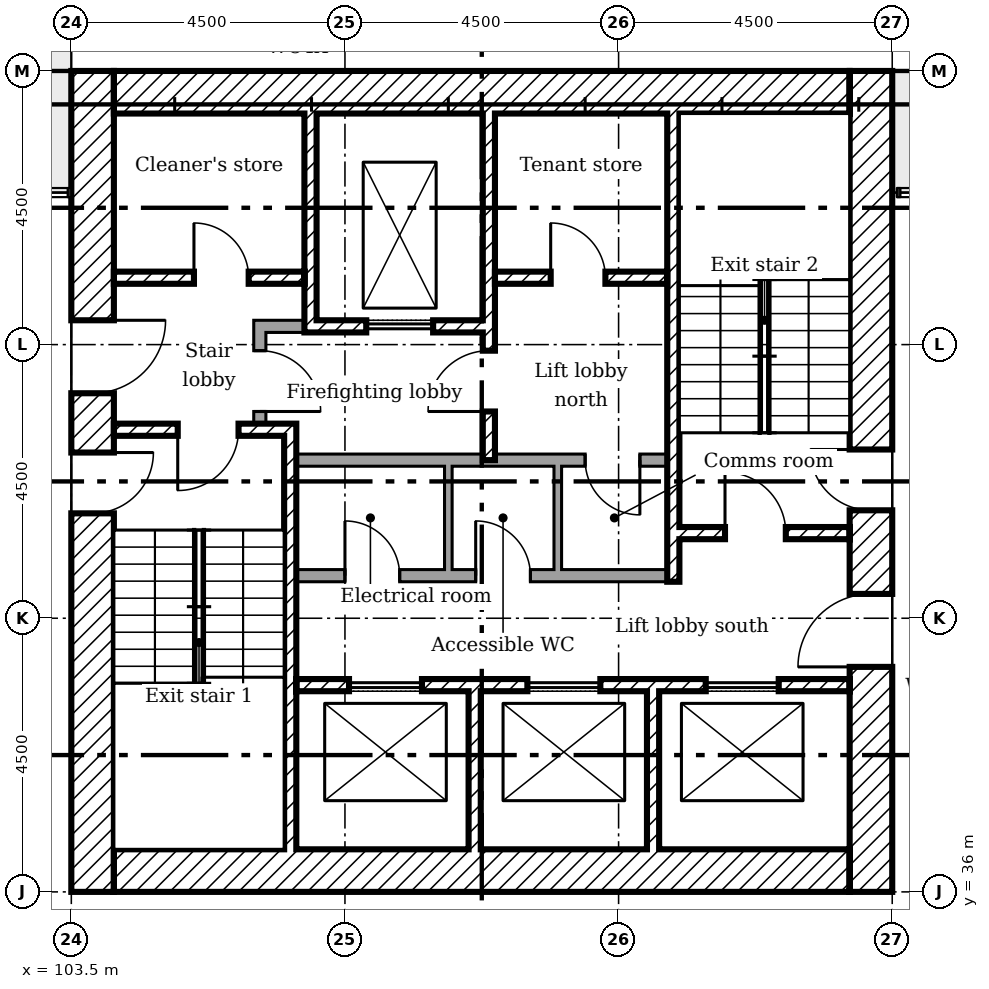
"""IFC4 building model, lengths in metres.
Left out: names, types, materials, properties, quantities, classifications, styles, units other than length and angle.
Written with IfcOpenShell. Run it as: python <this file> out.ifc"""

import sys

from ifc_helpers import new_model, si_unit, direction, frame, frame_2d, origin, place, context, subcontext, project, spatial, rectangle, extrude, element, fill, save


model = new_model("IFC4")
c1 = context("Model", 3, precision=1e-05, world=origin(), true_north=direction((0.0, 1.0)))
c2 = subcontext(c1, "Body", "Model", "MODEL_VIEW")
j1 = project(units=[si_unit("LENGTHUNIT", "METRE"), si_unit("PLANEANGLEUNIT", "RADIAN")], contexts=[c1])
p1 = place(None, origin())
s1 = spatial("IfcSite", under=j1, at=p1, CompositionType="ELEMENT")
p2 = place(p1, origin())
s2 = spatial("IfcBuilding", under=s1, at=p2, CompositionType="ELEMENT")
p3 = place(p2, frame((0.0, 0.0, 131.6)))
s3 = spatial("IfcBuildingStorey", under=s2, at=p3, CompositionType="ELEMENT", Elevation=131.6)
p4 = place(p3, frame((116.65, 36.0, 0.0), z_axis=(0.0, 0.0, 1.0), x_axis=(0.0, 1.0, 0.0)))
e1 = element("IfcWall", 1, at=p4, inside=s3, PredefinedType="SHEAR", context=c2, shape_type="SweptSolid", body=[
    extrude(rectangle(XDim=13.5, YDim=0.7, at=frame_2d((6.75, 0.0))), origin(), (0.0, 0.0, 1.0), 3.35),
])
p5 = place(p4, frame((3.7, 0.0, 0.0)))
e2 = element("IfcOpeningElement", 2, at=p5, cuts=e1, PredefinedType="OPENING", context=c2, shape_type="SweptSolid", body=[
    extrude(rectangle(XDim=1.2, YDim=2.1, at=frame_2d((0.6, 1.05))), frame((0.0, 0.36, 0.0), z_axis=(0.0, -1.0, 0.0), x_axis=(1.0, 0.0, 0.0)), (0.0, 0.0, 1.0), 0.72),
])
p6 = place(p4, frame((6.275, 0.0, 0.0)))
e3 = element("IfcOpeningElement", 3, at=p6, cuts=e1, PredefinedType="OPENING", context=c2, shape_type="SweptSolid", body=[
    extrude(rectangle(XDim=1.0, YDim=2.1, at=frame_2d((0.5, 1.05))), frame((0.0, 0.36, 0.0), z_axis=(0.0, -1.0, 0.0), x_axis=(1.0, 0.0, 0.0)), (0.0, 0.0, 1.0), 0.72),
])
for number, where in (
    (4, (104.2, 49.15, 0.0)),
    (5, (104.2, 36.35, 0.0)),
):
    element("IfcWall", number, at=place(p3, frame(where)), inside=s3, PredefinedType="SHEAR", context=c2, shape_type="SweptSolid", body=[
        extrude(rectangle(XDim=12.1, YDim=0.7, at=frame_2d((6.05, 0.0))), origin(), (0.0, 0.0, 1.0), 3.35),
    ])
p7 = place(p3, frame((103.85, 36.0, 0.0), z_axis=(0.0, 0.0, 1.0), x_axis=(0.0, 1.0, 0.0)))
e6 = element("IfcWall", 6, at=p7, inside=s3, PredefinedType="SHEAR", context=c2, shape_type="SweptSolid", body=[
    extrude(rectangle(XDim=13.5, YDim=0.7, at=frame_2d((6.75, 0.0))), origin(), (0.0, 0.0, 1.0), 3.35),
])
p8 = place(p7, frame((8.2, 0.0, 0.0)))
e7 = element("IfcOpeningElement", 7, at=p8, cuts=e6, PredefinedType="OPENING", context=c2, shape_type="SweptSolid", body=[
    extrude(rectangle(XDim=1.2, YDim=2.1, at=frame_2d((0.6, 1.05))), frame((0.0, 0.36, 0.0), z_axis=(0.0, -1.0, 0.0), x_axis=(1.0, 0.0, 0.0)), (0.0, 0.0, 1.0), 0.72),
])
p9 = place(p7, frame((6.225, 0.0, 0.0)))
e8 = element("IfcOpeningElement", 8, at=p9, cuts=e6, PredefinedType="OPENING", context=c2, shape_type="SweptSolid", body=[
    extrude(rectangle(XDim=1.0, YDim=2.1, at=frame_2d((0.5, 1.05))), frame((0.0, 0.36, 0.0), z_axis=(0.0, -1.0, 0.0), x_axis=(1.0, 0.0, 0.0)), (0.0, 0.0, 1.0), 0.72),
])
p10 = place(p3, frame((107.433, 48.8, 0.0), z_axis=(0.0, 0.0, 1.0), x_axis=(0.0, -1.0, 0.0)))
e9 = element("IfcWall", 9, at=p10, inside=s3, PredefinedType="SHEAR", context=c2, shape_type="SweptSolid", body=[
    extrude(rectangle(XDim=3.6, YDim=0.2, at=frame_2d((1.8, 0.0))), origin(), (0.0, 0.0, 1.0), 3.35),
])
p11 = place(p3, frame((110.367, 48.8, 0.0), z_axis=(0.0, 0.0, 1.0), x_axis=(0.0, -1.0, 0.0)))
e10 = element("IfcWall", 10, at=p11, inside=s3, PredefinedType="SHEAR", context=c2, shape_type="SweptSolid", body=[
    extrude(rectangle(XDim=5.7, YDim=0.2, at=frame_2d((2.85, 0.0))), origin(), (0.0, 0.0, 1.0), 3.35),
])
p12 = place(p11, frame((3.9, 0.0, 0.0)))
e11 = element("IfcOpeningElement", 11, at=p12, cuts=e10, PredefinedType="OPENING", context=c2, shape_type="SweptSolid", body=[
    extrude(rectangle(XDim=1.0, YDim=2.1, at=frame_2d((0.5, 1.05))), frame((0.0, 0.11, 0.0), z_axis=(0.0, -1.0, 0.0), x_axis=(1.0, 0.0, 0.0)), (0.0, 0.0, 1.0), 0.22),
])
for number, where, z_axis, x_axis in (
    (12, (110.133, 36.7, 0.0), (0.0, 0.0, 1.0), (0.0, 1.0, 0.0)),
    (13, (113.067, 36.7, 0.0), (0.0, 0.0, 1.0), (0.0, 1.0, 0.0)),
):
    element("IfcWall", number, at=place(p3, frame(where, z_axis=z_axis, x_axis=x_axis)), inside=s3, PredefinedType="SHEAR", context=c2, shape_type="SweptSolid", body=[
        extrude(rectangle(XDim=2.6, YDim=0.2, at=frame_2d((1.3, 0.0))), origin(), (0.0, 0.0, 1.0), 3.35),
    ])
p13 = place(p3, frame((106.5, 45.3, 0.0)))
e14 = element("IfcWall", 14, at=p13, inside=s3, PredefinedType="PARTITIONING", context=c2, shape_type="SweptSolid", body=[
    extrude(rectangle(XDim=0.833, YDim=0.2, at=frame_2d((0.417, 0.0))), origin(), (0.0, 0.0, 1.0), 3.35),
])
p14 = place(p3, frame((106.6, 43.7, 0.0), z_axis=(0.0, 0.0, 1.0), x_axis=(0.0, 1.0, 0.0)))
e15 = element("IfcWall", 15, at=p14, inside=s3, PredefinedType="PARTITIONING", context=c2, shape_type="SweptSolid", body=[
    extrude(rectangle(XDim=1.5, YDim=0.2, at=frame_2d((0.75, 0.0))), origin(), (0.0, 0.0, 1.0), 3.35),
])
p15 = place(p14, frame((0.2, 0.0, 0.0)))
e16 = element("IfcOpeningElement", 16, at=p15, cuts=e15, PredefinedType="OPENING", context=c2, shape_type="SweptSolid", body=[
    extrude(rectangle(XDim=1.0, YDim=2.1, at=frame_2d((0.5, 1.05))), frame((0.0, 0.11, 0.0), z_axis=(0.0, -1.0, 0.0), x_axis=(1.0, 0.0, 0.0)), (0.0, 0.0, 1.0), 0.22),
])
p16 = place(p3, frame((104.2, 46.1, 0.0)))
e17 = element("IfcWall", 17, at=p16, inside=s3, PredefinedType="SHEAR", context=c2, shape_type="SweptSolid", body=[
    extrude(rectangle(XDim=3.133, YDim=0.2, at=frame_2d((1.567, 0.0))), origin(), (0.0, 0.0, 1.0), 3.35),
])
p17 = place(p16, frame((1.317, 0.0, 0.0)))
e18 = element("IfcOpeningElement", 18, at=p17, cuts=e17, PredefinedType="OPENING", context=c2, shape_type="SweptSolid", body=[
    extrude(rectangle(XDim=0.9, YDim=2.1, at=frame_2d((0.45, 1.05))), frame((0.0, 0.11, 0.0), z_axis=(0.0, -1.0, 0.0), x_axis=(1.0, 0.0, 0.0)), (0.0, 0.0, 1.0), 0.22),
])
p18 = place(p3, frame((110.467, 46.1, 0.0)))
e19 = element("IfcWall", 19, at=p18, inside=s3, PredefinedType="SHEAR", context=c2, shape_type="SweptSolid", body=[
    extrude(rectangle(XDim=2.833, YDim=0.2, at=frame_2d((1.417, 0.0))), origin(), (0.0, 0.0, 1.0), 3.35),
])
p19 = place(p18, frame((0.917, 0.0, 0.0)))
e20 = element("IfcOpeningElement", 20, at=p19, cuts=e19, PredefinedType="OPENING", context=c2, shape_type="SweptSolid", body=[
    extrude(rectangle(XDim=0.9, YDim=2.1, at=frame_2d((0.45, 1.05))), frame((0.0, 0.11, 0.0), z_axis=(0.0, -1.0, 0.0), x_axis=(1.0, 0.0, 0.0)), (0.0, 0.0, 1.0), 0.22),
])
p20 = place(p3, frame((107.533, 45.3, 0.0)))
e21 = element("IfcWall", 21, at=p20, inside=s3, PredefinedType="SHEAR", context=c2, shape_type="SweptSolid", body=[
    extrude(rectangle(XDim=2.733, YDim=0.2, at=frame_2d((1.367, 0.0))), origin(), (0.0, 0.0, 1.0), 3.35),
])
p21 = place(p20, frame((0.817, 0.0, 0.0)))
e22 = element("IfcOpeningElement", 22, at=p21, cuts=e21, PredefinedType="OPENING", context=c2, shape_type="SweptSolid", body=[
    extrude(rectangle(XDim=1.1, YDim=2.1, at=frame_2d((0.55, 1.05))), frame((0.0, 0.11, 0.0), z_axis=(0.0, -1.0, 0.0), x_axis=(1.0, 0.0, 0.0)), (0.0, 0.0, 1.0), 0.22),
])
p22 = place(p3, frame((107.2, 39.4, 0.0)))
e23 = element("IfcWall", 23, at=p22, inside=s3, PredefinedType="SHEAR", context=c2, shape_type="SweptSolid", body=[
    extrude(rectangle(XDim=9.1, YDim=0.2, at=frame_2d((4.55, 0.0))), origin(), (0.0, 0.0, 1.0), 3.35),
])
p23 = place(p22, frame((0.867, 0.0, 0.0)))
e24 = element("IfcOpeningElement", 24, at=p23, cuts=e23, PredefinedType="OPENING", context=c2, shape_type="SweptSolid", body=[
    extrude(rectangle(XDim=1.2, YDim=2.1, at=frame_2d((0.6, 1.05))), frame((0.0, 0.11, 0.0), z_axis=(0.0, -1.0, 0.0), x_axis=(1.0, 0.0, 0.0)), (0.0, 0.0, 1.0), 0.22),
])
p24 = place(p22, frame((3.8, 0.0, 0.0)))
e25 = element("IfcOpeningElement", 25, at=p24, cuts=e23, PredefinedType="OPENING", context=c2, shape_type="SweptSolid", body=[
    extrude(rectangle(XDim=1.2, YDim=2.1, at=frame_2d((0.6, 1.05))), frame((0.0, 0.11, 0.0), z_axis=(0.0, -1.0, 0.0), x_axis=(1.0, 0.0, 0.0)), (0.0, 0.0, 1.0), 0.22),
])
p25 = place(p22, frame((6.733, 0.0, 0.0)))
e26 = element("IfcOpeningElement", 26, at=p25, cuts=e23, PredefinedType="OPENING", context=c2, shape_type="SweptSolid", body=[
    extrude(rectangle(XDim=1.2, YDim=2.1, at=frame_2d((0.6, 1.05))), frame((0.0, 0.11, 0.0), z_axis=(0.0, -1.0, 0.0), x_axis=(1.0, 0.0, 0.0)), (0.0, 0.0, 1.0), 0.22),
])
p26 = place(p3, frame((107.1, 36.7, 0.0), z_axis=(0.0, 0.0, 1.0), x_axis=(0.0, 1.0, 0.0)))
e27 = element("IfcWall", 27, at=p26, inside=s3, PredefinedType="SHEAR", context=c2, shape_type="SweptSolid", body=[
    extrude(rectangle(XDim=7.0, YDim=0.2, at=frame_2d((3.5, 0.0))), origin(), (0.0, 0.0, 1.0), 3.35),
])
p27 = place(p3, frame((104.2, 43.6, 0.0)))
e28 = element("IfcWall", 28, at=p27, inside=s3, PredefinedType="SHEAR", context=c2, shape_type="SweptSolid", body=[
    extrude(rectangle(XDim=2.8, YDim=0.2, at=frame_2d((1.4, 0.0))), origin(), (0.0, 0.0, 1.0), 3.35),
])
p28 = place(p27, frame((1.05, 0.0, 0.0)))
e29 = element("IfcOpeningElement", 29, at=p28, cuts=e28, PredefinedType="OPENING", context=c2, shape_type="SweptSolid", body=[
    extrude(rectangle(XDim=1.0, YDim=2.1, at=frame_2d((0.5, 1.05))), frame((0.0, 0.11, 0.0), z_axis=(0.0, -1.0, 0.0), x_axis=(1.0, 0.0, 0.0)), (0.0, 0.0, 1.0), 0.22),
])
p29 = place(p3, frame((113.5, 41.9, 0.0)))
e30 = element("IfcWall", 30, at=p29, inside=s3, PredefinedType="SHEAR", context=c2, shape_type="SweptSolid", body=[
    extrude(rectangle(XDim=2.8, YDim=0.2, at=frame_2d((1.4, 0.0))), origin(), (0.0, 0.0, 1.0), 3.35),
])
p30 = place(p29, frame((0.75, 0.0, 0.0)))
e31 = element("IfcOpeningElement", 31, at=p30, cuts=e30, PredefinedType="OPENING", context=c2, shape_type="SweptSolid", body=[
    extrude(rectangle(XDim=1.0, YDim=2.1, at=frame_2d((0.5, 1.05))), frame((0.0, 0.11, 0.0), z_axis=(0.0, -1.0, 0.0), x_axis=(1.0, 0.0, 0.0)), (0.0, 0.0, 1.0), 0.22),
])
p31 = place(p3, frame((113.4, 41.1, 0.0), z_axis=(0.0, 0.0, 1.0), x_axis=(0.0, 1.0, 0.0)))
e32 = element("IfcWall", 32, at=p31, inside=s3, PredefinedType="SHEAR", context=c2, shape_type="SweptSolid", body=[
    extrude(rectangle(XDim=7.7, YDim=0.2, at=frame_2d((3.85, 0.0))), origin(), (0.0, 0.0, 1.0), 3.35),
])
p32 = place(p3, frame((107.2, 43.1, 0.0)))
e33 = element("IfcWall", 33, at=p32, inside=s3, PredefinedType="PARTITIONING", context=c2, shape_type="SweptSolid", body=[
    extrude(rectangle(XDim=6.1, YDim=0.2, at=frame_2d((3.05, 0.0))), origin(), (0.0, 0.0, 1.0), 3.35),
])
p33 = place(p32, frame((4.75, 0.0, 0.0)))
e34 = element("IfcOpeningElement", 34, at=p33, cuts=e33, PredefinedType="OPENING", context=c2, shape_type="SweptSolid", body=[
    extrude(rectangle(XDim=0.9, YDim=2.1, at=frame_2d((0.45, 1.05))), frame((0.0, 0.11, 0.0), z_axis=(0.0, -1.0, 0.0), x_axis=(1.0, 0.0, 0.0)), (0.0, 0.0, 1.0), 0.22),
])
p34 = place(p3, frame((107.2, 41.2, 0.0)))
e35 = element("IfcWall", 35, at=p34, inside=s3, PredefinedType="PARTITIONING", context=c2, shape_type="SweptSolid", body=[
    extrude(rectangle(XDim=6.1, YDim=0.2, at=frame_2d((3.05, 0.0))), origin(), (0.0, 0.0, 1.0), 3.35),
])
p35 = place(p34, frame((0.8, 0.0, 0.0)))
e36 = element("IfcOpeningElement", 36, at=p35, cuts=e35, PredefinedType="OPENING", context=c2, shape_type="SweptSolid", body=[
    extrude(rectangle(XDim=0.9, YDim=2.1, at=frame_2d((0.45, 1.05))), frame((0.0, 0.11, 0.0), z_axis=(0.0, -1.0, 0.0), x_axis=(1.0, 0.0, 0.0)), (0.0, 0.0, 1.0), 0.22),
])
p36 = place(p34, frame((2.95, 0.0, 0.0)))
e37 = element("IfcOpeningElement", 37, at=p36, cuts=e35, PredefinedType="OPENING", context=c2, shape_type="SweptSolid", body=[
    extrude(rectangle(XDim=0.9, YDim=2.1, at=frame_2d((0.45, 1.05))), frame((0.0, 0.11, 0.0), z_axis=(0.0, -1.0, 0.0), x_axis=(1.0, 0.0, 0.0)), (0.0, 0.0, 1.0), 0.22),
])
for number, where, z_axis, x_axis in (
    (38, (109.7, 41.3, 0.0), (0.0, 0.0, 1.0), (0.0, 1.0, 0.0)),
    (39, (111.5, 41.3, 0.0), (0.0, 0.0, 1.0), (0.0, 1.0, 0.0)),
):
    element("IfcWall", number, at=place(p3, frame(where, z_axis=z_axis, x_axis=x_axis)), inside=s3, PredefinedType="PARTITIONING", context=c2, shape_type="SweptSolid", body=[
        extrude(rectangle(XDim=1.7, YDim=0.125, at=frame_2d((0.85, 0.0))), origin(), (0.0, 0.0, 1.0), 3.35),
    ])
p37 = place(p8, frame((1.2, 0.0, 0.0), x_axis=(-1.0, 0.0, 0.0)))
e40 = element("IfcDoor", 40, at=p37, inside=s3, OperationType="SINGLE_SWING_RIGHT", PredefinedType="DOOR", context=c2, shape_type="SweptSolid", body=[
    extrude(rectangle(XDim=1.2, YDim=2.1, at=frame_2d((0.6, 1.05))), frame((0.0, 0.025, 0.0), z_axis=(0.0, -1.0, 0.0), x_axis=(1.0, 0.0, 0.0)), (0.0, 0.0, 1.0), 0.05),
])
fill(e7, e40)
p38 = place(p5, origin())
e41 = element("IfcDoor", 41, at=p38, inside=s3, OperationType="SINGLE_SWING_RIGHT", PredefinedType="DOOR", context=c2, shape_type="SweptSolid", body=[
    extrude(rectangle(XDim=1.2, YDim=2.1, at=frame_2d((0.6, 1.05))), frame((0.0, 0.025, 0.0), z_axis=(0.0, -1.0, 0.0), x_axis=(1.0, 0.0, 0.0)), (0.0, 0.0, 1.0), 0.05),
])
fill(e2, e41)
p39 = place(p28, frame((1.0, 0.0, 0.0), x_axis=(-1.0, 0.0, 0.0)))
e42 = element("IfcDoor", 42, at=p39, inside=s3, OperationType="SINGLE_SWING_LEFT", PredefinedType="DOOR", context=c2, shape_type="SweptSolid", body=[
    extrude(rectangle(XDim=1.0, YDim=2.1, at=frame_2d((0.5, 1.05))), frame((0.0, 0.025, 0.0), z_axis=(0.0, -1.0, 0.0), x_axis=(1.0, 0.0, 0.0)), (0.0, 0.0, 1.0), 0.05),
])
fill(e29, e42)
p40 = place(p9, frame((1.0, 0.0, 0.0), x_axis=(-1.0, 0.0, 0.0)))
e43 = element("IfcDoor", 43, at=p40, inside=s3, OperationType="SINGLE_SWING_RIGHT", PredefinedType="DOOR", context=c2, shape_type="SweptSolid", body=[
    extrude(rectangle(XDim=1.0, YDim=2.1, at=frame_2d((0.5, 1.05))), frame((0.0, 0.025, 0.0), z_axis=(0.0, -1.0, 0.0), x_axis=(1.0, 0.0, 0.0)), (0.0, 0.0, 1.0), 0.05),
])
fill(e8, e43)
p41 = place(p30, origin())
e44 = element("IfcDoor", 44, at=p41, inside=s3, OperationType="SINGLE_SWING_RIGHT", PredefinedType="DOOR", context=c2, shape_type="SweptSolid", body=[
    extrude(rectangle(XDim=1.0, YDim=2.1, at=frame_2d((0.5, 1.05))), frame((0.0, 0.025, 0.0), z_axis=(0.0, -1.0, 0.0), x_axis=(1.0, 0.0, 0.0)), (0.0, 0.0, 1.0), 0.05),
])
fill(e31, e44)
p42 = place(p6, origin())
e45 = element("IfcDoor", 45, at=p42, inside=s3, OperationType="SINGLE_SWING_LEFT", PredefinedType="DOOR", context=c2, shape_type="SweptSolid", body=[
    extrude(rectangle(XDim=1.0, YDim=2.1, at=frame_2d((0.5, 1.05))), frame((0.0, 0.025, 0.0), z_axis=(0.0, -1.0, 0.0), x_axis=(1.0, 0.0, 0.0)), (0.0, 0.0, 1.0), 0.05),
])
fill(e3, e45)
p43 = place(p12, frame((1.0, 0.0, 0.0), x_axis=(-1.0, 0.0, 0.0)))
e46 = element("IfcDoor", 46, at=p43, inside=s3, OperationType="SINGLE_SWING_RIGHT", PredefinedType="DOOR", context=c2, shape_type="SweptSolid", body=[
    extrude(rectangle(XDim=1.0, YDim=2.1, at=frame_2d((0.5, 1.05))), frame((0.0, 0.025, 0.0), z_axis=(0.0, -1.0, 0.0), x_axis=(1.0, 0.0, 0.0)), (0.0, 0.0, 1.0), 0.05),
])
fill(e11, e46)
p44 = place(p15, frame((1.0, 0.0, 0.0), x_axis=(-1.0, 0.0, 0.0)))
e47 = element("IfcDoor", 47, at=p44, inside=s3, OperationType="SINGLE_SWING_LEFT", PredefinedType="DOOR", context=c2, shape_type="SweptSolid", body=[
    extrude(rectangle(XDim=1.0, YDim=2.1, at=frame_2d((0.5, 1.05))), frame((0.0, 0.025, 0.0), z_axis=(0.0, -1.0, 0.0), x_axis=(1.0, 0.0, 0.0)), (0.0, 0.0, 1.0), 0.05),
])
fill(e16, e47)
p45 = place(p17, origin())
e48 = element("IfcDoor", 48, at=p45, inside=s3, OperationType="SINGLE_SWING_RIGHT", PredefinedType="DOOR", context=c2, shape_type="SweptSolid", body=[
    extrude(rectangle(XDim=0.9, YDim=2.1, at=frame_2d((0.45, 1.05))), frame((0.0, 0.025, 0.0), z_axis=(0.0, -1.0, 0.0), x_axis=(1.0, 0.0, 0.0)), (0.0, 0.0, 1.0), 0.05),
])
fill(e18, e48)
p46 = place(p19, origin())
e49 = element("IfcDoor", 49, at=p46, inside=s3, OperationType="SINGLE_SWING_RIGHT", PredefinedType="DOOR", context=c2, shape_type="SweptSolid", body=[
    extrude(rectangle(XDim=0.9, YDim=2.1, at=frame_2d((0.45, 1.05))), frame((0.0, 0.025, 0.0), z_axis=(0.0, -1.0, 0.0), x_axis=(1.0, 0.0, 0.0)), (0.0, 0.0, 1.0), 0.05),
])
fill(e20, e49)
p47 = place(p35, origin())
e50 = element("IfcDoor", 50, at=p47, inside=s3, OperationType="SINGLE_SWING_RIGHT", PredefinedType="DOOR", context=c2, shape_type="SweptSolid", body=[
    extrude(rectangle(XDim=0.9, YDim=2.1, at=frame_2d((0.45, 1.05))), frame((0.0, 0.025, 0.0), z_axis=(0.0, -1.0, 0.0), x_axis=(1.0, 0.0, 0.0)), (0.0, 0.0, 1.0), 0.05),
])
fill(e36, e50)
p48 = place(p36, origin())
e51 = element("IfcDoor", 51, at=p48, inside=s3, OperationType="SINGLE_SWING_RIGHT", PredefinedType="DOOR", context=c2, shape_type="SweptSolid", body=[
    extrude(rectangle(XDim=0.9, YDim=2.1, at=frame_2d((0.45, 1.05))), frame((0.0, 0.025, 0.0), z_axis=(0.0, -1.0, 0.0), x_axis=(1.0, 0.0, 0.0)), (0.0, 0.0, 1.0), 0.05),
])
fill(e37, e51)
p49 = place(p33, frame((0.9, 0.0, 0.0), x_axis=(-1.0, 0.0, 0.0)))
e52 = element("IfcDoor", 52, at=p49, inside=s3, OperationType="SINGLE_SWING_RIGHT", PredefinedType="DOOR", context=c2, shape_type="SweptSolid", body=[
    extrude(rectangle(XDim=0.9, YDim=2.1, at=frame_2d((0.45, 1.05))), frame((0.0, 0.025, 0.0), z_axis=(0.0, -1.0, 0.0), x_axis=(1.0, 0.0, 0.0)), (0.0, 0.0, 1.0), 0.05),
])
fill(e34, e52)
p50 = place(p21, origin())
e53 = element("IfcDoor", 53, at=p50, inside=s3, OperationType="SLIDING_TO_LEFT", PredefinedType="DOOR", context=c2, shape_type="SweptSolid", body=[
    extrude(rectangle(XDim=1.1, YDim=2.1, at=frame_2d((0.55, 1.05))), frame((0.0, 0.025, 0.0), z_axis=(0.0, -1.0, 0.0), x_axis=(1.0, 0.0, 0.0)), (0.0, 0.0, 1.0), 0.05),
])
fill(e22, e53)
p51 = place(p23, origin())
e54 = element("IfcDoor", 54, at=p51, inside=s3, OperationType="SLIDING_TO_LEFT", PredefinedType="DOOR", context=c2, shape_type="SweptSolid", body=[
    extrude(rectangle(XDim=1.2, YDim=2.1, at=frame_2d((0.6, 1.05))), frame((0.0, 0.025, 0.0), z_axis=(0.0, -1.0, 0.0), x_axis=(1.0, 0.0, 0.0)), (0.0, 0.0, 1.0), 0.05),
])
fill(e24, e54)
p52 = place(p24, origin())
e55 = element("IfcDoor", 55, at=p52, inside=s3, OperationType="SLIDING_TO_LEFT", PredefinedType="DOOR", context=c2, shape_type="SweptSolid", body=[
    extrude(rectangle(XDim=1.2, YDim=2.1, at=frame_2d((0.6, 1.05))), frame((0.0, 0.025, 0.0), z_axis=(0.0, -1.0, 0.0), x_axis=(1.0, 0.0, 0.0)), (0.0, 0.0, 1.0), 0.05),
])
fill(e25, e55)
p53 = place(p25, origin())
e56 = element("IfcDoor", 56, at=p53, inside=s3, OperationType="SLIDING_TO_LEFT", PredefinedType="DOOR", context=c2, shape_type="SweptSolid", body=[
    extrude(rectangle(XDim=1.2, YDim=2.1, at=frame_2d((0.6, 1.05))), frame((0.0, 0.025, 0.0), z_axis=(0.0, -1.0, 0.0), x_axis=(1.0, 0.0, 0.0)), (0.0, 0.0, 1.0), 0.05),
])
fill(e26, e56)
save(model, sys.argv[1])
